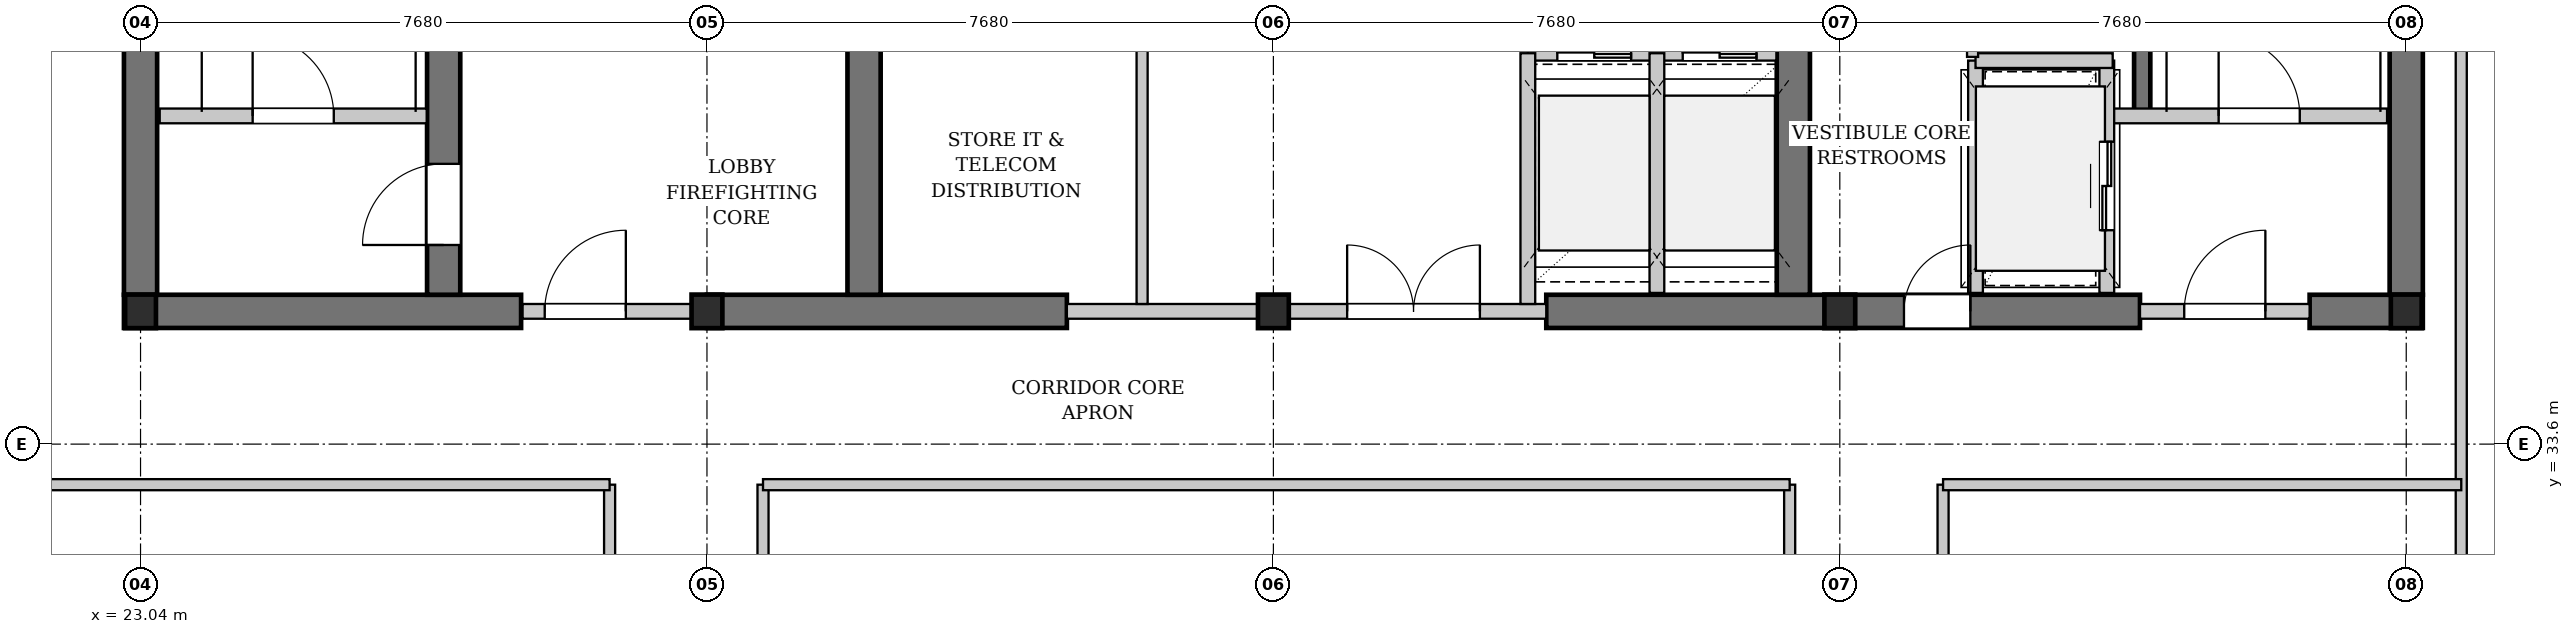
"""IFC4 building model, lengths in metres.
Left out: names, types, materials, properties, quantities, classifications, styles, units other than length and angle.
Written with IfcOpenShell. Run it as: python <this file> out.ifc"""

import sys

from ifc_helpers import new_model, si_unit, direction, frame, frame_2d, origin, origin_2d, place, context, subcontext, project, spatial, rectangle, i_section, extrude, element, fill, save


model = new_model("IFC4")
c1 = context("Model", 3, precision=1e-05, world=origin(), true_north=direction((0.0, 1.0)))
c2 = subcontext(c1, "Body", "Model", "MODEL_VIEW")
j1 = project(units=[si_unit("LENGTHUNIT", "METRE"), si_unit("PLANEANGLEUNIT", "RADIAN")], contexts=[c1])
p1 = place(None, origin())
s1 = spatial("IfcSite", under=j1, at=p1, CompositionType="ELEMENT")
p2 = place(p1, origin())
s2 = spatial("IfcBuilding", under=s1, at=p2, CompositionType="ELEMENT")
p3 = place(p2, frame((0.0, 0.0, 165.5)))
s3 = spatial("IfcBuildingStorey", under=s2, at=p3, CompositionType="ELEMENT", Elevation=165.5)
p4 = place(p3, frame((22.815, 35.4, 0.0), z_axis=(0.0, 0.0, 1.0), x_axis=(1.0, 0.0, 0.0)))
e1 = element("IfcWall", 1, at=p4, inside=s3, PredefinedType="SHEAR", context=c2, shape_type="SweptSolid", body=[
    extrude(rectangle(XDim=5.385, YDim=0.45, at=frame_2d((2.692, 0.0))), origin(), (0.0, 0.0, 1.0), 3.08),
])
p5 = place(p3, frame((30.72, 35.4, 0.0), z_axis=(0.0, 0.0, 1.0), x_axis=(1.0, 0.0, 0.0)))
e2 = element("IfcWall", 2, at=p5, inside=s3, PredefinedType="SHEAR", context=c2, shape_type="SweptSolid", body=[
    extrude(rectangle(XDim=4.88, YDim=0.45, at=frame_2d((2.44, 0.0))), origin(), (0.0, 0.0, 1.0), 3.08),
])
p6 = place(p3, frame((42.1, 35.4, 0.0), z_axis=(0.0, 0.0, 1.0), x_axis=(1.0, 0.0, 0.0)))
e3 = element("IfcWall", 3, at=p6, inside=s3, PredefinedType="SHEAR", context=c2, shape_type="SweptSolid", body=[
    extrude(rectangle(XDim=8.05, YDim=0.45, at=frame_2d((4.025, 0.0))), origin(), (0.0, 0.0, 1.0), 3.08),
])
p7 = place(p6, frame((4.85, 0.0, 0.0)))
e4 = element("IfcOpeningElement", 4, at=p7, cuts=e3, PredefinedType="OPENING", context=c2, shape_type="SweptSolid", body=[
    extrude(rectangle(XDim=0.9, YDim=2.15, at=frame_2d((0.45, 1.075))), frame((0.0, 0.235, 0.0), z_axis=(0.0, -1.0, 0.0), x_axis=(1.0, 0.0, 0.0)), (0.0, 0.0, 1.0), 0.47),
])
p8 = place(p3, frame((52.45, 35.4, 0.0), z_axis=(0.0, 0.0, 1.0), x_axis=(1.0, 0.0, 0.0)))
e5 = element("IfcWall", 5, at=p8, inside=s3, PredefinedType="SHEAR", context=c2, shape_type="SweptSolid", body=[
    extrude(rectangle(XDim=1.535, YDim=0.45, at=frame_2d((0.768, 0.0))), origin(), (0.0, 0.0, 1.0), 3.08),
])
p9 = place(p3, frame((23.04, 35.625, 0.0), z_axis=(0.0, 0.0, 1.0), x_axis=(0.0, 1.0, 0.0)))
e6 = element("IfcWall", 6, at=p9, inside=s3, PredefinedType="SHEAR", context=c2, shape_type="SweptSolid", body=[
    extrude(rectangle(XDim=10.35, YDim=0.45, at=frame_2d((5.175, 0.0))), origin(), (0.0, 0.0, 1.0), 3.08),
])
p10 = place(p3, frame((27.15, 35.625, 0.0), z_axis=(0.0, 0.0, 1.0), x_axis=(0.0, 1.0, 0.0)))
e7 = element("IfcWall", 7, at=p10, inside=s3, PredefinedType="SHEAR", context=c2, shape_type="SweptSolid", body=[
    extrude(rectangle(XDim=10.35, YDim=0.45, at=frame_2d((5.175, 0.0))), origin(), (0.0, 0.0, 1.0), 3.08),
])
p11 = place(p10, frame((0.675, 0.0, 0.0)))
e8 = element("IfcOpeningElement", 8, at=p11, cuts=e7, PredefinedType="OPENING", context=c2, shape_type="SweptSolid", body=[
    extrude(rectangle(XDim=1.1, YDim=2.15, at=frame_2d((0.55, 1.075))), frame((0.0, 0.235, 0.0), z_axis=(0.0, -1.0, 0.0), x_axis=(1.0, 0.0, 0.0)), (0.0, 0.0, 1.0), 0.47),
])
for number, where, z_axis, x_axis in (
    (9, (32.85, 35.625, 0.0), (0.0, 0.0, 1.0), (0.0, 1.0, 0.0)),
    (10, (45.45, 35.625, 0.0), (0.0, 0.0, 1.0), (0.0, 1.0, 0.0)),
    (11, (53.76, 35.625, 0.0), (0.0, 0.0, 1.0), (0.0, 1.0, 0.0)),
):
    element("IfcWall", number, at=place(p3, frame(where, z_axis=z_axis, x_axis=x_axis)), inside=s3, PredefinedType="SHEAR", context=c2, shape_type="SweptSolid", body=[
        extrude(rectangle(XDim=10.35, YDim=0.45, at=frame_2d((5.175, 0.0))), origin(), (0.0, 0.0, 1.0), 3.08),
    ])
p12 = place(p3, frame((50.18, 38.05, 0.0), z_axis=(0.0, 0.0, 1.0), x_axis=(0.0, 1.0, 0.0)))
e12 = element("IfcWall", 12, at=p12, inside=s3, PredefinedType="SHEAR", context=c2, shape_type="SweptSolid", body=[
    extrude(rectangle(XDim=7.925, YDim=0.22, at=frame_2d((3.962, 0.0))), origin(), (0.0, 0.0, 1.0), 3.08),
])
for number, where, z_axis, x_axis in (
    (13, (23.04, 35.4, 0.0), (0.0, 0.0, 1.0), (1.0, 0.0, 0.0)),
    (14, (30.72, 35.4, 0.0), (0.0, 0.0, 1.0), (1.0, 0.0, 0.0)),
    (15, (38.4, 35.4, 0.0), (0.0, 0.0, 1.0), (1.0, 0.0, 0.0)),
    (16, (46.08, 35.4, 0.0), (0.0, 0.0, 1.0), (1.0, 0.0, 0.0)),
    (17, (53.76, 35.4, 0.0), (0.0, 0.0, 1.0), (1.0, 0.0, 0.0)),
):
    element("IfcColumn", number, at=place(p3, frame(where, z_axis=z_axis, x_axis=x_axis)), inside=s3, PredefinedType="COLUMN", context=c2, shape_type="SweptSolid", body=[
        extrude(i_section(OverallWidth=0.418, OverallDepth=0.455, WebThickness=0.042, FlangeThickness=0.068, FilletRadius=0.015, at=origin_2d()), origin(), (0.0, 0.0, 1.0), 3.3),
    ])
p13 = place(p3, frame((23.3, 38.05, 0.0), z_axis=(0.0, 0.0, 1.0), x_axis=(1.0, 0.0, 0.0)))
e18 = element("IfcWall", 18, at=p13, inside=s3, PredefinedType="PARTITIONING", context=c2, shape_type="SweptSolid", body=[
    extrude(rectangle(XDim=3.62, YDim=0.2, at=frame_2d((1.81, 0.0))), origin(), (0.0, 0.0, 1.0), 3.08),
])
p14 = place(p13, frame((1.26, 0.0, 0.0)))
e19 = element("IfcOpeningElement", 19, at=p14, cuts=e18, PredefinedType="OPENING", context=c2, shape_type="SweptSolid", body=[
    extrude(rectangle(XDim=1.1, YDim=2.15, at=frame_2d((0.55, 1.075))), frame((0.0, 0.11, 0.0), z_axis=(0.0, -1.0, 0.0), x_axis=(1.0, 0.0, 0.0)), (0.0, 0.0, 1.0), 0.22),
])
p15 = place(p3, frame((28.22, 35.4, 0.0), z_axis=(0.0, 0.0, 1.0), x_axis=(1.0, 0.0, 0.0)))
e20 = element("IfcWall", 20, at=p15, inside=s3, PredefinedType="PARTITIONING", context=c2, shape_type="SweptSolid", body=[
    extrude(rectangle(XDim=2.5, YDim=0.2, at=frame_2d((1.25, 0.0))), origin(), (0.0, 0.0, 1.0), 2.475),
])
p16 = place(p15, frame((0.3, 0.0, 0.0)))
e21 = element("IfcOpeningElement", 21, at=p16, cuts=e20, PredefinedType="OPENING", context=c2, shape_type="SweptSolid", body=[
    extrude(rectangle(XDim=1.1, YDim=2.15, at=frame_2d((0.55, 1.075))), frame((0.0, 0.11, 0.0), z_axis=(0.0, -1.0, 0.0), x_axis=(1.0, 0.0, 0.0)), (0.0, 0.0, 1.0), 0.22),
])
p17 = place(p3, frame((35.6, 35.4, 0.0), z_axis=(0.0, 0.0, 1.0), x_axis=(1.0, 0.0, 0.0)))
e22 = element("IfcWall", 22, at=p17, inside=s3, PredefinedType="PARTITIONING", context=c2, shape_type="SweptSolid", body=[
    extrude(rectangle(XDim=6.5, YDim=0.2, at=frame_2d((3.25, 0.0))), origin(), (0.0, 0.0, 1.0), 2.475),
])
p18 = place(p17, frame((3.8, 0.0, 0.0)))
e23 = element("IfcOpeningElement", 23, at=p18, cuts=e22, PredefinedType="OPENING", context=c2, shape_type="SweptSolid", body=[
    extrude(rectangle(XDim=1.8, YDim=2.3, at=frame_2d((0.9, 1.15))), frame((0.0, 0.11, 0.0), z_axis=(0.0, -1.0, 0.0), x_axis=(1.0, 0.0, 0.0)), (0.0, 0.0, 1.0), 0.22),
])
p19 = place(p3, frame((36.62, 35.5, 0.0), z_axis=(0.0, 0.0, 1.0), x_axis=(0.0, 1.0, 0.0)))
e24 = element("IfcWall", 24, at=p19, inside=s3, PredefinedType="PARTITIONING", context=c2, shape_type="SweptSolid", body=[
    extrude(rectangle(XDim=10.42, YDim=0.15, at=frame_2d((5.21, 0.0))), origin(), (0.0, 0.0, 1.0), 3.08),
])
p20 = place(p19, frame((3.92, 0.0, 0.0)))
e25 = element("IfcOpeningElement", 25, at=p20, cuts=e24, PredefinedType="OPENING", context=c2, shape_type="SweptSolid", body=[
    extrude(rectangle(XDim=0.9, YDim=2.15, at=frame_2d((0.45, 1.075))), frame((0.0, 0.085, 0.0), z_axis=(0.0, -1.0, 0.0), x_axis=(1.0, 0.0, 0.0)), (0.0, 0.0, 1.0), 0.17),
])
p21 = place(p19, frame((5.85, 0.0, 0.0)))
e26 = element("IfcOpeningElement", 26, at=p21, cuts=e24, PredefinedType="OPENING", context=c2, shape_type="SweptSolid", body=[
    extrude(rectangle(XDim=0.9, YDim=2.15, at=frame_2d((0.45, 1.075))), frame((0.0, 0.085, 0.0), z_axis=(0.0, -1.0, 0.0), x_axis=(1.0, 0.0, 0.0)), (0.0, 0.0, 1.0), 0.17),
])
p22 = place(p3, frame((41.85, 38.9, 0.0), z_axis=(0.0, 0.0, 1.0), x_axis=(1.0, 0.0, 0.0)))
e27 = element("IfcWall", 27, at=p22, inside=s3, PredefinedType="PARTITIONING", context=c2, shape_type="SweptSolid", body=[
    extrude(rectangle(XDim=3.37, YDim=0.2, at=frame_2d((1.685, 0.0))), origin(), (0.0, 0.0, 1.0), 3.08),
])
p23 = place(p22, frame((0.4, 0.0, 0.0)))
e28 = element("IfcOpeningElement", 28, at=p23, cuts=e27, PredefinedType="OPENING", context=c2, shape_type="SweptSolid", body=[
    extrude(rectangle(XDim=1.0, YDim=2.2, at=frame_2d((0.5, 1.1))), frame((0.0, 0.11, 0.0), z_axis=(0.0, -1.0, 0.0), x_axis=(1.0, 0.0, 0.0)), (0.0, 0.0, 1.0), 0.22),
])
p24 = place(p22, frame((2.1, 0.0, 0.0)))
e29 = element("IfcOpeningElement", 29, at=p24, cuts=e27, PredefinedType="OPENING", context=c2, shape_type="SweptSolid", body=[
    extrude(rectangle(XDim=1.0, YDim=2.2, at=frame_2d((0.5, 1.1))), frame((0.0, 0.11, 0.0), z_axis=(0.0, -1.0, 0.0), x_axis=(1.0, 0.0, 0.0)), (0.0, 0.0, 1.0), 0.22),
])
p25 = place(p3, frame((43.6, 35.65, 0.0), z_axis=(0.0, 0.0, 1.0), x_axis=(0.0, 1.0, 0.0)))
e30 = element("IfcWall", 30, at=p25, inside=s3, PredefinedType="PARTITIONING", context=c2, shape_type="SweptSolid", body=[
    extrude(rectangle(XDim=3.25, YDim=0.2, at=frame_2d((1.625, 0.0))), origin(), (0.0, 0.0, 1.0), 3.08),
])
p26 = place(p3, frame((41.85, 35.5, 0.0), z_axis=(0.0, 0.0, 1.0), x_axis=(0.0, 1.0, 0.0)))
e31 = element("IfcWall", 31, at=p26, inside=s3, PredefinedType="PARTITIONING", context=c2, shape_type="SweptSolid", body=[
    extrude(rectangle(XDim=3.4, YDim=0.2, at=frame_2d((1.7, 0.0))), origin(), (0.0, 0.0, 1.0), 3.08),
])
p27 = place(p3, frame((49.78, 38.05, 0.0), z_axis=(0.0, 0.0, 1.0), x_axis=(1.0, 0.0, 0.0)))
e32 = element("IfcWall", 32, at=p27, inside=s3, PredefinedType="PARTITIONING", context=c2, shape_type="SweptSolid", body=[
    extrude(rectangle(XDim=3.72, YDim=0.2, at=frame_2d((1.86, 0.0))), origin(), (0.0, 0.0, 1.0), 3.08),
])
p28 = place(p27, frame((1.436, 0.0, 0.0)))
e33 = element("IfcOpeningElement", 33, at=p28, cuts=e32, PredefinedType="OPENING", context=c2, shape_type="SweptSolid", body=[
    extrude(rectangle(XDim=1.1, YDim=2.15, at=frame_2d((0.55, 1.075))), frame((0.0, 0.11, 0.0), z_axis=(0.0, -1.0, 0.0), x_axis=(1.0, 0.0, 0.0)), (0.0, 0.0, 1.0), 0.22),
])
p29 = place(p3, frame((50.15, 35.4, 0.0), z_axis=(0.0, 0.0, 1.0), x_axis=(1.0, 0.0, 0.0)))
e34 = element("IfcWall", 34, at=p29, inside=s3, PredefinedType="PARTITIONING", context=c2, shape_type="SweptSolid", body=[
    extrude(rectangle(XDim=2.3, YDim=0.2, at=frame_2d((1.15, 0.0))), origin(), (0.0, 0.0, 1.0), 2.475),
])
p30 = place(p29, frame((0.6, 0.0, 0.0)))
e35 = element("IfcOpeningElement", 35, at=p30, cuts=e34, PredefinedType="OPENING", context=c2, shape_type="SweptSolid", body=[
    extrude(rectangle(XDim=1.1, YDim=2.15, at=frame_2d((0.55, 1.075))), frame((0.0, 0.11, 0.0), z_axis=(0.0, -1.0, 0.0), x_axis=(1.0, 0.0, 0.0)), (0.0, 0.0, 1.0), 0.22),
])
p31 = place(p3, frame((49.7, 35.65, 0.0), z_axis=(0.0, 0.0, 1.0), x_axis=(0.0, 1.0, 0.0)))
e36 = element("IfcWall", 36, at=p31, inside=s3, PredefinedType="PARTITIONING", context=c2, shape_type="SweptSolid", body=[
    extrude(rectangle(XDim=3.15, YDim=0.2, at=frame_2d((1.575, 0.0))), origin(), (0.0, 0.0, 1.0), 3.08),
])
p32 = place(p31, frame((0.85, 0.0, 0.0)))
e37 = element("IfcOpeningElement", 37, at=p32, cuts=e36, PredefinedType="OPENING", context=c2, shape_type="SweptSolid", body=[
    extrude(rectangle(XDim=1.2, YDim=2.2, at=frame_2d((0.6, 1.1))), frame((0.0, 0.11, 0.0), z_axis=(0.0, -1.0, 0.0), x_axis=(1.0, 0.0, 0.0)), (0.0, 0.0, 1.0), 0.22),
])
p33 = place(p3, frame((47.92, 35.65, 0.0), z_axis=(0.0, 0.0, 1.0), x_axis=(0.0, 1.0, 0.0)))
e38 = element("IfcWall", 38, at=p33, inside=s3, PredefinedType="PARTITIONING", context=c2, shape_type="SweptSolid", body=[
    extrude(rectangle(XDim=3.15, YDim=0.2, at=frame_2d((1.575, 0.0))), origin(), (0.0, 0.0, 1.0), 3.08),
])
p34 = place(p3, frame((47.92, 38.8, 0.0), z_axis=(0.0, 0.0, 1.0), x_axis=(1.0, 0.0, 0.0)))
e39 = element("IfcWall", 39, at=p34, inside=s3, PredefinedType="PARTITIONING", context=c2, shape_type="SweptSolid", body=[
    extrude(rectangle(XDim=1.86, YDim=0.2, at=frame_2d((0.93, 0.0))), origin(), (0.0, 0.0, 1.0), 3.08),
])
p35 = place(p3, frame((47.88, 38.85, 0.0), z_axis=(0.0, 0.0, 1.0), x_axis=(0.0, 1.0, 0.0)))
e40 = element("IfcWall", 40, at=p35, inside=s3, PredefinedType="PARTITIONING", context=c2, shape_type="SweptSolid", body=[
    extrude(rectangle(XDim=4.87, YDim=0.15, at=frame_2d((2.435, 0.0))), origin(), (0.0, 0.0, 1.0), 3.08),
])
p36 = place(p35, frame((0.7, 0.0, 0.0)))
e41 = element("IfcOpeningElement", 41, at=p36, cuts=e40, PredefinedType="OPENING", context=c2, shape_type="SweptSolid", body=[
    extrude(rectangle(XDim=0.9, YDim=2.15, at=frame_2d((0.45, 1.075))), frame((0.0, 0.085, 0.0), z_axis=(0.0, -1.0, 0.0), x_axis=(1.0, 0.0, 0.0)), (0.0, 0.0, 1.0), 0.17),
])
p37 = place(p35, frame((3.15, 0.0, 0.0)))
e42 = element("IfcOpeningElement", 42, at=p37, cuts=e40, PredefinedType="OPENING", context=c2, shape_type="SweptSolid", body=[
    extrude(rectangle(XDim=0.9, YDim=2.15, at=frame_2d((0.45, 1.075))), frame((0.0, 0.085, 0.0), z_axis=(0.0, -1.0, 0.0), x_axis=(1.0, 0.0, 0.0)), (0.0, 0.0, 1.0), 0.17),
])
p38 = place(p3, frame((54.506, 22.3, 0.0), z_axis=(0.0, 0.0, 1.0), x_axis=(0.0, 1.0, 0.0)))
e43 = element("IfcWall", 43, at=p38, inside=s3, PredefinedType="PARTITIONING", context=c2, shape_type="SweptSolid", body=[
    extrude(rectangle(XDim=24.126, YDim=0.15, at=frame_2d((12.063, 0.0))), origin(), (0.0, 0.0, 1.0), 3.08),
])
p39 = place(p38, frame((0.528, 0.0, 0.0)))
e44 = element("IfcOpeningElement", 44, at=p39, cuts=e43, PredefinedType="OPENING", context=c2, shape_type="SweptSolid", body=[
    extrude(rectangle(XDim=0.9, YDim=2.15, at=frame_2d((0.45, 1.075))), frame((0.0, 0.085, 0.0), z_axis=(0.0, -1.0, 0.0), x_axis=(1.0, 0.0, 0.0)), (0.0, 0.0, 1.0), 0.17),
])
for number, where, z_axis, x_axis in (
    (45, (29.4, 24.38, 0.0), (0.0, 0.0, 1.0), (0.0, 1.0, 0.0)),
    (46, (31.48, 24.38, 0.0), (0.0, 0.0, 1.0), (0.0, 1.0, 0.0)),
    (47, (45.4, 24.38, 0.0), (0.0, 0.0, 1.0), (0.0, 1.0, 0.0)),
    (48, (47.48, 24.38, 0.0), (0.0, 0.0, 1.0), (0.0, 1.0, 0.0)),
):
    element("IfcWall", number, at=place(p3, frame(where, z_axis=z_axis, x_axis=x_axis)), inside=s3, PredefinedType="PARTITIONING", context=c2, shape_type="SweptSolid", body=[
        extrude(rectangle(XDim=8.67, YDim=0.15, at=frame_2d((4.335, 0.0))), origin(), (0.0, 0.0, 1.0), 3.08),
    ])
p40 = place(p3, frame((8.601, 33.05, 0.0), z_axis=(0.0, 0.0, 1.0), x_axis=(1.0, 0.0, 0.0)))
e49 = element("IfcWall", 49, at=p40, inside=s3, PredefinedType="PARTITIONING", context=c2, shape_type="SweptSolid", body=[
    extrude(rectangle(XDim=20.799, YDim=0.15, at=frame_2d((10.399, 0.0))), origin(), (0.0, 0.0, 1.0), 2.475),
])
p41 = place(p3, frame((31.48, 33.05, 0.0), z_axis=(0.0, 0.0, 1.0), x_axis=(1.0, 0.0, 0.0)))
e50 = element("IfcWall", 50, at=p41, inside=s3, PredefinedType="PARTITIONING", context=c2, shape_type="SweptSolid", body=[
    extrude(rectangle(XDim=13.92, YDim=0.15, at=frame_2d((6.96, 0.0))), origin(), (0.0, 0.0, 1.0), 3.08),
])
p42 = place(p3, frame((47.48, 33.05, 0.0), z_axis=(0.0, 0.0, 1.0), x_axis=(1.0, 0.0, 0.0)))
e51 = element("IfcWall", 51, at=p42, inside=s3, PredefinedType="PARTITIONING", context=c2, shape_type="SweptSolid", body=[
    extrude(rectangle(XDim=7.026, YDim=0.15, at=frame_2d((3.513, 0.0))), origin(), (0.0, 0.0, 1.0), 3.08),
])
p43 = place(p14, origin())
e52 = element("IfcDoor", 52, at=p43, inside=s3, OperationType="SINGLE_SWING_LEFT", PredefinedType="DOOR", context=c2, shape_type="SweptSolid", body=[
    extrude(rectangle(XDim=1.1, YDim=2.15, at=frame_2d((0.55, 1.075))), frame((0.0, 0.025, 0.0), z_axis=(0.0, -1.0, 0.0), x_axis=(1.0, 0.0, 0.0)), (0.0, 0.0, 1.0), 0.05),
])
fill(e19, e52)
p44 = place(p16, origin())
e53 = element("IfcDoor", 53, at=p44, inside=s3, OperationType="SINGLE_SWING_RIGHT", PredefinedType="DOOR", context=c2, shape_type="SweptSolid", body=[
    extrude(rectangle(XDim=1.1, YDim=2.15, at=frame_2d((0.55, 1.075))), frame((0.0, 0.025, 0.0), z_axis=(0.0, -1.0, 0.0), x_axis=(1.0, 0.0, 0.0)), (0.0, 0.0, 1.0), 0.05),
])
fill(e21, e53)
p45 = place(p18, origin())
e54 = element("IfcDoor", 54, at=p45, inside=s3, OperationType="DOUBLE_DOOR_SINGLE_SWING", PredefinedType="DOOR", context=c2, shape_type="SweptSolid", body=[
    extrude(rectangle(XDim=1.8, YDim=2.3, at=frame_2d((0.9, 1.15))), frame((0.0, 0.025, 0.0), z_axis=(0.0, -1.0, 0.0), x_axis=(1.0, 0.0, 0.0)), (0.0, 0.0, 1.0), 0.05),
])
fill(e23, e54)
p46 = place(p23, origin())
e55 = element("IfcDoor", 55, at=p46, inside=s3, OperationType="DOUBLE_DOOR_SLIDING", PredefinedType="DOOR", context=c2, shape_type="SweptSolid", body=[
    extrude(rectangle(XDim=1.0, YDim=2.2, at=frame_2d((0.5, 1.1))), frame((0.0, 0.025, 0.0), z_axis=(0.0, -1.0, 0.0), x_axis=(1.0, 0.0, 0.0)), (0.0, 0.0, 1.0), 0.05),
])
fill(e28, e55)
p47 = place(p24, origin())
e56 = element("IfcDoor", 56, at=p47, inside=s3, OperationType="DOUBLE_DOOR_SLIDING", PredefinedType="DOOR", context=c2, shape_type="SweptSolid", body=[
    extrude(rectangle(XDim=1.0, YDim=2.2, at=frame_2d((0.5, 1.1))), frame((0.0, 0.025, 0.0), z_axis=(0.0, -1.0, 0.0), x_axis=(1.0, 0.0, 0.0)), (0.0, 0.0, 1.0), 0.05),
])
fill(e29, e56)
p48 = place(p28, origin())
e57 = element("IfcDoor", 57, at=p48, inside=s3, OperationType="SINGLE_SWING_LEFT", PredefinedType="DOOR", context=c2, shape_type="SweptSolid", body=[
    extrude(rectangle(XDim=1.1, YDim=2.15, at=frame_2d((0.55, 1.075))), frame((0.0, 0.025, 0.0), z_axis=(0.0, -1.0, 0.0), x_axis=(1.0, 0.0, 0.0)), (0.0, 0.0, 1.0), 0.05),
])
fill(e33, e57)
p49 = place(p30, origin())
e58 = element("IfcDoor", 58, at=p49, inside=s3, OperationType="SINGLE_SWING_RIGHT", PredefinedType="DOOR", context=c2, shape_type="SweptSolid", body=[
    extrude(rectangle(XDim=1.1, YDim=2.15, at=frame_2d((0.55, 1.075))), frame((0.0, 0.025, 0.0), z_axis=(0.0, -1.0, 0.0), x_axis=(1.0, 0.0, 0.0)), (0.0, 0.0, 1.0), 0.05),
])
fill(e35, e58)
p50 = place(p32, origin())
e59 = element("IfcDoor", 59, at=p50, inside=s3, OperationType="DOUBLE_DOOR_SLIDING", PredefinedType="DOOR", context=c2, shape_type="SweptSolid", body=[
    extrude(rectangle(XDim=1.2, YDim=2.2, at=frame_2d((0.6, 1.1))), frame((0.0, 0.025, 0.0), z_axis=(0.0, -1.0, 0.0), x_axis=(1.0, 0.0, 0.0)), (0.0, 0.0, 1.0), 0.05),
])
fill(e37, e59)
p51 = place(p11, origin())
e60 = element("IfcDoor", 60, at=p51, inside=s3, OperationType="SINGLE_SWING_LEFT", PredefinedType="DOOR", context=c2, shape_type="SweptSolid", body=[
    extrude(rectangle(XDim=1.1, YDim=2.15, at=frame_2d((0.55, 1.075))), frame((0.0, 0.025, 0.0), z_axis=(0.0, -1.0, 0.0), x_axis=(1.0, 0.0, 0.0)), (0.0, 0.0, 1.0), 0.05),
])
fill(e8, e60)
p52 = place(p7, origin())
e61 = element("IfcDoor", 61, at=p52, inside=s3, OperationType="SINGLE_SWING_RIGHT", PredefinedType="DOOR", context=c2, shape_type="SweptSolid", body=[
    extrude(rectangle(XDim=0.9, YDim=2.15, at=frame_2d((0.45, 1.075))), frame((0.0, 0.025, 0.0), z_axis=(0.0, -1.0, 0.0), x_axis=(1.0, 0.0, 0.0)), (0.0, 0.0, 1.0), 0.05),
])
fill(e4, e61)
save(model, sys.argv[1])
